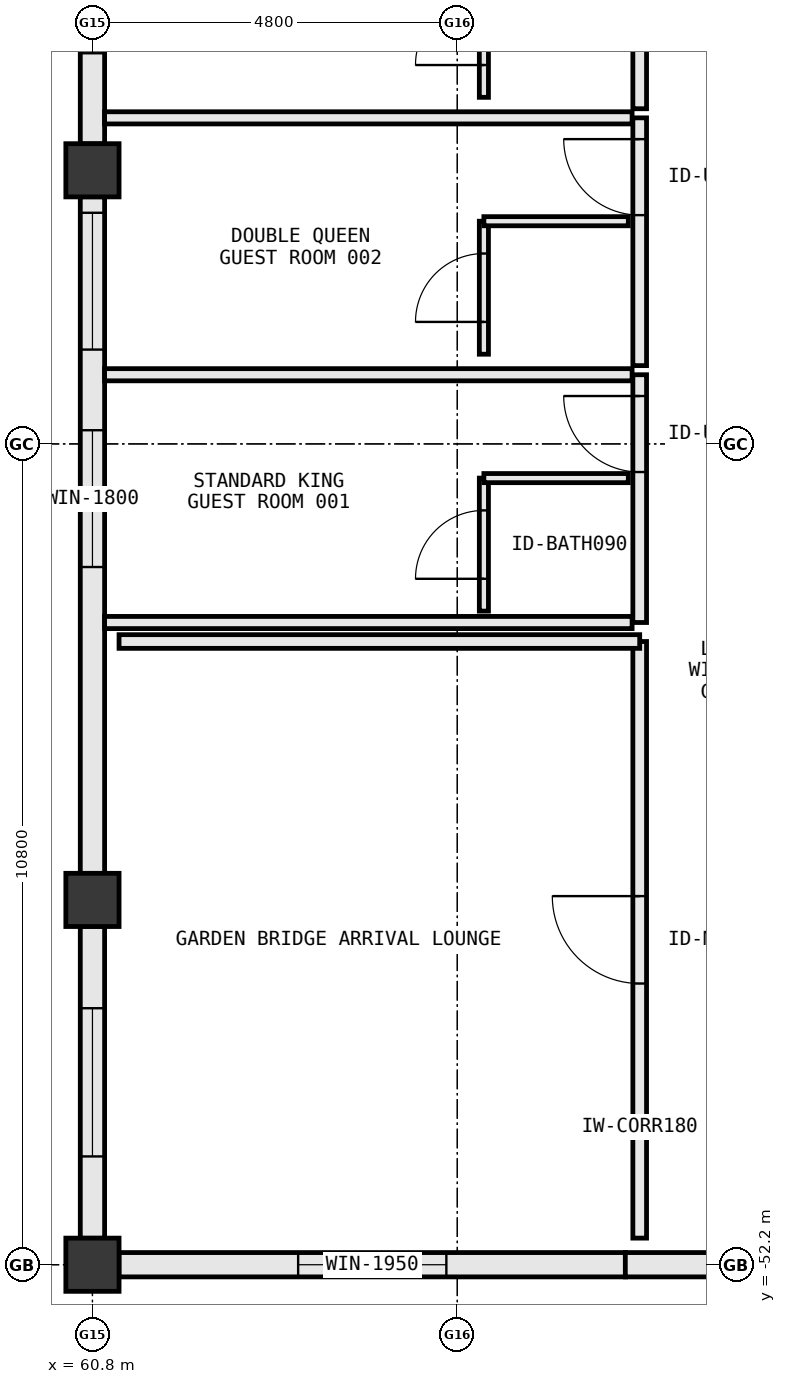
"""IFC4 building model, lengths in metres.
Left out: names, types, materials, properties, quantities, classifications, styles, units other than length and angle.
Written with IfcOpenShell. Run it as: python <this file> out.ifc"""

import sys

from ifc_helpers import new_model, si_unit, direction, frame, frame_2d, origin, origin_2d, place, context, subcontext, project, spatial, rectangle, extrude, element, fill, save


model = new_model("IFC4")
c1 = context("Model", 3, precision=1e-05, world=origin(), true_north=direction((0.0, 1.0)))
c2 = subcontext(c1, "Body", "Model", "MODEL_VIEW")
j1 = project(units=[si_unit("LENGTHUNIT", "METRE"), si_unit("PLANEANGLEUNIT", "RADIAN")], contexts=[c1])
p1 = place(None, origin())
s1 = spatial("IfcSite", under=j1, at=p1, CompositionType="ELEMENT")
p2 = place(p1, origin())
s2 = spatial("IfcBuilding", under=s1, at=p2, CompositionType="ELEMENT")
p3 = place(p2, frame((0.0, 0.0, 10.8)))
s3 = spatial("IfcBuildingStorey", under=s2, at=p3, CompositionType="ELEMENT", Elevation=10.8)
for number, where, z_axis, x_axis in (
    (1, (60.8, -52.2, 0.0), (0.0, 0.0, 1.0), (1.0, 0.0, 0.0)),
    (2, (60.8, -47.4, 0.0), (0.0, 0.0, 1.0), (1.0, 0.0, 0.0)),
    (3, (60.8, -37.8, 0.0), (0.0, 0.0, 1.0), (1.0, 0.0, 0.0)),
):
    element("IfcColumn", number, at=place(p3, frame(where, z_axis=z_axis, x_axis=x_axis)), inside=s3, PredefinedType="COLUMN", context=c2, shape_type="SweptSolid", body=[
        extrude(rectangle(XDim=0.7, YDim=0.7, at=origin_2d()), origin(), (0.0, 0.0, 1.0), 5.4),
    ])
p4 = place(p3, frame((61.148, -52.2, 0.0), z_axis=(0.0, 0.0, 1.0), x_axis=(1.0, 0.0, 0.0)))
e4 = element("IfcWall", 4, at=p4, inside=s3, PredefinedType="STANDARD", context=c2, shape_type="SweptSolid", body=[
    extrude(rectangle(XDim=6.667, YDim=0.32, at=frame_2d((3.333, 0.0))), origin(), (0.0, 0.0, 1.0), 4.183),
])
p5 = place(p4, frame((2.358, 0.0, 0.85)))
e5 = element("IfcOpeningElement", 5, at=p5, cuts=e4, PredefinedType="OPENING", context=c2, shape_type="SweptSolid", body=[
    extrude(rectangle(XDim=1.95, YDim=1.9, at=frame_2d((0.975, 0.95))), frame((0.0, 0.172, 0.0), z_axis=(0.0, -1.0, 0.0), x_axis=(1.0, 0.0, 0.0)), (0.0, 0.0, 1.0), 0.344),
])
p6 = place(p3, frame((67.811, -52.2, 0.0), z_axis=(0.0, 0.0, 1.0), x_axis=(1.0, 0.0, 0.0)))
e6 = element("IfcWall", 6, at=p6, inside=s3, PredefinedType="STANDARD", context=c2, shape_type="SweptSolid", body=[
    extrude(rectangle(XDim=6.667, YDim=0.32, at=frame_2d((3.333, 0.0))), origin(), (0.0, 0.0, 1.0), 4.183),
])
p7 = place(p3, frame((60.8, -28.548, 0.0), z_axis=(0.0, 0.0, 1.0), x_axis=(0.0, -1.0, 0.0)))
e7 = element("IfcWall", 7, at=p7, inside=s3, PredefinedType="STANDARD", context=c2, shape_type="SweptSolid", body=[
    extrude(rectangle(XDim=8.904, YDim=0.32, at=frame_2d((4.452, 0.0))), origin(), (0.0, 0.0, 1.0), 4.155),
])
p8 = place(p7, frame((5.912, 0.0, 0.85)))
e8 = element("IfcOpeningElement", 8, at=p8, cuts=e7, PredefinedType="OPENING", context=c2, shape_type="SweptSolid", body=[
    extrude(rectangle(XDim=1.8, YDim=1.85, at=frame_2d((0.9, 0.925))), frame((0.0, 0.172, 0.0), z_axis=(0.0, -1.0, 0.0), x_axis=(1.0, 0.0, 0.0)), (0.0, 0.0, 1.0), 0.344),
])
p9 = place(p7, frame((2.532, 0.0, 0.85)))
e9 = element("IfcOpeningElement", 9, at=p9, cuts=e7, PredefinedType="OPENING", context=c2, shape_type="SweptSolid", body=[
    extrude(rectangle(XDim=1.8, YDim=1.85, at=frame_2d((0.9, 0.925))), frame((0.0, 0.172, 0.0), z_axis=(0.0, -1.0, 0.0), x_axis=(1.0, 0.0, 0.0)), (0.0, 0.0, 1.0), 0.344),
])
p10 = place(p7, frame((0.166, 0.0, 0.85)))
e10 = element("IfcOpeningElement", 10, at=p10, cuts=e7, PredefinedType="OPENING", context=c2, shape_type="SweptSolid", body=[
    extrude(rectangle(XDim=1.35, YDim=1.65, at=frame_2d((0.675, 0.825))), frame((0.0, 0.172, 0.0), z_axis=(0.0, -1.0, 0.0), x_axis=(1.0, 0.0, 0.0)), (0.0, 0.0, 1.0), 0.344),
])
p11 = place(p3, frame((60.8, -38.148, 0.0), z_axis=(0.0, 0.0, 1.0), x_axis=(0.0, -1.0, 0.0)))
e11 = element("IfcWall", 11, at=p11, inside=s3, PredefinedType="STANDARD", context=c2, shape_type="SweptSolid", body=[
    extrude(rectangle(XDim=8.904, YDim=0.32, at=frame_2d((4.452, 0.0))), origin(), (0.0, 0.0, 1.0), 4.155),
])
p12 = place(p11, frame((3.072, 0.0, 0.85)))
e12 = element("IfcOpeningElement", 12, at=p12, cuts=e11, PredefinedType="OPENING", context=c2, shape_type="SweptSolid", body=[
    extrude(rectangle(XDim=1.8, YDim=1.85, at=frame_2d((0.9, 0.925))), frame((0.0, 0.172, 0.0), z_axis=(0.0, -1.0, 0.0), x_axis=(1.0, 0.0, 0.0)), (0.0, 0.0, 1.0), 0.344),
])
p13 = place(p11, frame((0.211, 0.0, 0.85)))
e13 = element("IfcOpeningElement", 13, at=p13, cuts=e11, PredefinedType="OPENING", context=c2, shape_type="SweptSolid", body=[
    extrude(rectangle(XDim=1.8, YDim=1.85, at=frame_2d((0.9, 0.925))), frame((0.0, 0.172, 0.0), z_axis=(0.0, -1.0, 0.0), x_axis=(1.0, 0.0, 0.0)), (0.0, 0.0, 1.0), 0.344),
])
p14 = place(p3, frame((60.8, -47.748, 0.0), z_axis=(0.0, 0.0, 1.0), x_axis=(0.0, -1.0, 0.0)))
e14 = element("IfcWall", 14, at=p14, inside=s3, PredefinedType="STANDARD", context=c2, shape_type="SweptSolid", body=[
    extrude(rectangle(XDim=4.104, YDim=0.32, at=frame_2d((2.052, 0.0))), origin(), (0.0, 0.0, 1.0), 4.255),
])
p15 = place(p14, frame((1.077, 0.0, 0.85)))
e15 = element("IfcOpeningElement", 15, at=p15, cuts=e14, PredefinedType="OPENING", context=c2, shape_type="SweptSolid", body=[
    extrude(rectangle(XDim=1.95, YDim=1.9, at=frame_2d((0.975, 0.95))), frame((0.0, 0.172, 0.0), z_axis=(0.0, -1.0, 0.0), x_axis=(1.0, 0.0, 0.0)), (0.0, 0.0, 1.0), 0.344),
])
p16 = place(p3, frame((68.0, -51.85, 0.0), z_axis=(0.0, 0.0, 1.0), x_axis=(0.0, 1.0, 0.0)))
e16 = element("IfcWall", 16, at=p16, inside=s3, PredefinedType="PARTITIONING", context=c2, shape_type="SweptSolid", body=[
    extrude(rectangle(XDim=7.85, YDim=0.18, at=frame_2d((3.925, 0.0))), origin(), (0.0, 0.0, 1.0), 4.8),
])
p17 = place(p16, frame((3.35, 0.0, 0.0)))
e17 = element("IfcOpeningElement", 17, at=p17, cuts=e16, PredefinedType="OPENING", context=c2, shape_type="SweptSolid", body=[
    extrude(rectangle(XDim=1.15, YDim=2.2, at=frame_2d((0.575, 1.1))), frame((0.0, 0.102, 0.0), z_axis=(0.0, -1.0, 0.0), x_axis=(1.0, 0.0, 0.0)), (0.0, 0.0, 1.0), 0.204),
])
p18 = place(p3, frame((68.0, -44.0, 0.0), z_axis=(0.0, 0.0, 1.0), x_axis=(-1.0, 0.0, 0.0)))
e18 = element("IfcWall", 18, at=p18, inside=s3, PredefinedType="PARTITIONING", context=c2, shape_type="SweptSolid", body=[
    extrude(rectangle(XDim=6.85, YDim=0.18, at=frame_2d((3.425, 0.0))), origin(), (0.0, 0.0, 1.0), 4.8),
])
p19 = place(p3, frame((68.0, -43.75, 0.0), z_axis=(0.0, 0.0, 1.0), x_axis=(0.0, 1.0, 0.0)))
e19 = element("IfcWall", 19, at=p19, inside=s3, PredefinedType="PARTITIONING", context=c2, shape_type="SweptSolid", body=[
    extrude(rectangle(XDim=3.26, YDim=0.18, at=frame_2d((1.63, 0.0))), origin(), (0.0, 0.0, 1.0), 4.8),
])
p20 = place(p19, frame((1.98, 0.0, 0.0)))
e20 = element("IfcOpeningElement", 20, at=p20, cuts=e19, PredefinedType="OPENING", context=c2, shape_type="SweptSolid", body=[
    extrude(rectangle(XDim=1.0, YDim=2.2, at=frame_2d((0.5, 1.1))), frame((0.0, 0.102, 0.0), z_axis=(0.0, -1.0, 0.0), x_axis=(1.0, 0.0, 0.0)), (0.0, 0.0, 1.0), 0.204),
])
for number, where, z_axis, x_axis in (
    (21, (60.96, -43.75, 0.0), (0.0, 0.0, 1.0), (1.0, 0.0, 0.0)),
    (22, (60.96, -40.49, 0.0), (0.0, 0.0, 1.0), (1.0, 0.0, 0.0)),
):
    element("IfcWall", number, at=place(p3, frame(where, z_axis=z_axis, x_axis=x_axis)), inside=s3, PredefinedType="PARTITIONING", context=c2, shape_type="SweptSolid", body=[
        extrude(rectangle(XDim=6.94, YDim=0.16, at=frame_2d((3.47, 0.0))), origin(), (0.0, 0.0, 1.0), 4.8),
    ])
p21 = place(p3, frame((65.95, -43.6, 0.0), z_axis=(0.0, 0.0, 1.0), x_axis=(0.0, 1.0, 0.0)))
e23 = element("IfcWall", 23, at=p21, inside=s3, PredefinedType="PARTITIONING", context=c2, shape_type="SweptSolid", body=[
    extrude(rectangle(XDim=1.75, YDim=0.12, at=frame_2d((0.875, 0.0))), origin(), (0.0, 0.0, 1.0), 4.8),
])
p22 = place(p21, frame((0.425, 0.0, 0.0)))
e24 = element("IfcOpeningElement", 24, at=p22, cuts=e23, PredefinedType="OPENING", context=c2, shape_type="SweptSolid", body=[
    extrude(rectangle(XDim=0.9, YDim=2.15, at=frame_2d((0.45, 1.075))), frame((0.0, 0.072, 0.0), z_axis=(0.0, -1.0, 0.0), x_axis=(1.0, 0.0, 0.0)), (0.0, 0.0, 1.0), 0.144),
])
p23 = place(p3, frame((65.95, -41.85, 0.0), z_axis=(0.0, 0.0, 1.0), x_axis=(1.0, 0.0, 0.0)))
e25 = element("IfcWall", 25, at=p23, inside=s3, PredefinedType="PARTITIONING", context=c2, shape_type="SweptSolid", body=[
    extrude(rectangle(XDim=1.9, YDim=0.12, at=frame_2d((0.95, 0.0))), origin(), (0.0, 0.0, 1.0), 4.8),
])
p24 = place(p3, frame((68.0, -40.37, 0.0), z_axis=(0.0, 0.0, 1.0), x_axis=(0.0, 1.0, 0.0)))
e26 = element("IfcWall", 26, at=p24, inside=s3, PredefinedType="PARTITIONING", context=c2, shape_type="SweptSolid", body=[
    extrude(rectangle(XDim=3.26, YDim=0.18, at=frame_2d((1.63, 0.0))), origin(), (0.0, 0.0, 1.0), 4.8),
])
p25 = place(p24, frame((1.98, 0.0, 0.0)))
e27 = element("IfcOpeningElement", 27, at=p25, cuts=e26, PredefinedType="OPENING", context=c2, shape_type="SweptSolid", body=[
    extrude(rectangle(XDim=1.0, YDim=2.2, at=frame_2d((0.5, 1.1))), frame((0.0, 0.102, 0.0), z_axis=(0.0, -1.0, 0.0), x_axis=(1.0, 0.0, 0.0)), (0.0, 0.0, 1.0), 0.204),
])
p26 = place(p3, frame((60.96, -37.11, 0.0), z_axis=(0.0, 0.0, 1.0), x_axis=(1.0, 0.0, 0.0)))
e28 = element("IfcWall", 28, at=p26, inside=s3, PredefinedType="PARTITIONING", context=c2, shape_type="SweptSolid", body=[
    extrude(rectangle(XDim=6.94, YDim=0.16, at=frame_2d((3.47, 0.0))), origin(), (0.0, 0.0, 1.0), 4.8),
])
p27 = place(p3, frame((65.95, -40.22, 0.0), z_axis=(0.0, 0.0, 1.0), x_axis=(0.0, 1.0, 0.0)))
e29 = element("IfcWall", 29, at=p27, inside=s3, PredefinedType="PARTITIONING", context=c2, shape_type="SweptSolid", body=[
    extrude(rectangle(XDim=1.75, YDim=0.12, at=frame_2d((0.875, 0.0))), origin(), (0.0, 0.0, 1.0), 4.8),
])
p28 = place(p27, frame((0.425, 0.0, 0.0)))
e30 = element("IfcOpeningElement", 30, at=p28, cuts=e29, PredefinedType="OPENING", context=c2, shape_type="SweptSolid", body=[
    extrude(rectangle(XDim=0.9, YDim=2.15, at=frame_2d((0.45, 1.075))), frame((0.0, 0.072, 0.0), z_axis=(0.0, -1.0, 0.0), x_axis=(1.0, 0.0, 0.0)), (0.0, 0.0, 1.0), 0.144),
])
p29 = place(p3, frame((65.95, -38.47, 0.0), z_axis=(0.0, 0.0, 1.0), x_axis=(1.0, 0.0, 0.0)))
e31 = element("IfcWall", 31, at=p29, inside=s3, PredefinedType="PARTITIONING", context=c2, shape_type="SweptSolid", body=[
    extrude(rectangle(XDim=1.9, YDim=0.12, at=frame_2d((0.95, 0.0))), origin(), (0.0, 0.0, 1.0), 4.8),
])
p30 = place(p3, frame((68.0, -36.99, 0.0), z_axis=(0.0, 0.0, 1.0), x_axis=(0.0, 1.0, 0.0)))
e32 = element("IfcWall", 32, at=p30, inside=s3, PredefinedType="PARTITIONING", context=c2, shape_type="SweptSolid", body=[
    extrude(rectangle(XDim=3.26, YDim=0.18, at=frame_2d((1.63, 0.0))), origin(), (0.0, 0.0, 1.0), 4.8),
])
p31 = place(p30, frame((1.98, 0.0, 0.0)))
e33 = element("IfcOpeningElement", 33, at=p31, cuts=e32, PredefinedType="OPENING", context=c2, shape_type="SweptSolid", body=[
    extrude(rectangle(XDim=1.0, YDim=2.2, at=frame_2d((0.5, 1.1))), frame((0.0, 0.102, 0.0), z_axis=(0.0, -1.0, 0.0), x_axis=(1.0, 0.0, 0.0)), (0.0, 0.0, 1.0), 0.204),
])
p32 = place(p3, frame((65.95, -36.84, 0.0), z_axis=(0.0, 0.0, 1.0), x_axis=(0.0, 1.0, 0.0)))
e34 = element("IfcWall", 34, at=p32, inside=s3, PredefinedType="PARTITIONING", context=c2, shape_type="SweptSolid", body=[
    extrude(rectangle(XDim=1.75, YDim=0.12, at=frame_2d((0.875, 0.0))), origin(), (0.0, 0.0, 1.0), 4.8),
])
p33 = place(p32, frame((0.425, 0.0, 0.0)))
e35 = element("IfcOpeningElement", 35, at=p33, cuts=e34, PredefinedType="OPENING", context=c2, shape_type="SweptSolid", body=[
    extrude(rectangle(XDim=0.9, YDim=2.15, at=frame_2d((0.45, 1.075))), frame((0.0, 0.072, 0.0), z_axis=(0.0, -1.0, 0.0), x_axis=(1.0, 0.0, 0.0)), (0.0, 0.0, 1.0), 0.144),
])
p34 = place(p5, origin())
e36 = element("IfcWindow", 36, at=p34, inside=s3, PartitioningType="DOUBLE_PANEL_VERTICAL", PredefinedType="WINDOW", context=c2, shape_type="SweptSolid", body=[
    extrude(rectangle(XDim=1.95, YDim=1.9, at=frame_2d((0.975, 0.95))), frame((0.0, 0.03, 0.0), z_axis=(0.0, -1.0, 0.0), x_axis=(1.0, 0.0, 0.0)), (0.0, 0.0, 1.0), 0.06),
])
fill(e5, e36)
p35 = place(p15, origin())
e37 = element("IfcWindow", 37, at=p35, inside=s3, PartitioningType="DOUBLE_PANEL_VERTICAL", PredefinedType="WINDOW", context=c2, shape_type="SweptSolid", body=[
    extrude(rectangle(XDim=1.95, YDim=1.9, at=frame_2d((0.975, 0.95))), frame((0.0, 0.03, 0.0), z_axis=(0.0, -1.0, 0.0), x_axis=(1.0, 0.0, 0.0)), (0.0, 0.0, 1.0), 0.06),
])
fill(e15, e37)
p36 = place(p12, origin())
e38 = element("IfcWindow", 38, at=p36, inside=s3, PartitioningType="SINGLE_PANEL", PredefinedType="WINDOW", context=c2, shape_type="SweptSolid", body=[
    extrude(rectangle(XDim=1.8, YDim=1.85, at=frame_2d((0.9, 0.925))), frame((0.0, 0.03, 0.0), z_axis=(0.0, -1.0, 0.0), x_axis=(1.0, 0.0, 0.0)), (0.0, 0.0, 1.0), 0.06),
])
fill(e12, e38)
p37 = place(p13, origin())
e39 = element("IfcWindow", 39, at=p37, inside=s3, PartitioningType="SINGLE_PANEL", PredefinedType="WINDOW", context=c2, shape_type="SweptSolid", body=[
    extrude(rectangle(XDim=1.8, YDim=1.85, at=frame_2d((0.9, 0.925))), frame((0.0, 0.03, 0.0), z_axis=(0.0, -1.0, 0.0), x_axis=(1.0, 0.0, 0.0)), (0.0, 0.0, 1.0), 0.06),
])
fill(e13, e39)
p38 = place(p8, origin())
e40 = element("IfcWindow", 40, at=p38, inside=s3, PartitioningType="SINGLE_PANEL", PredefinedType="WINDOW", context=c2, shape_type="SweptSolid", body=[
    extrude(rectangle(XDim=1.8, YDim=1.85, at=frame_2d((0.9, 0.925))), frame((0.0, 0.03, 0.0), z_axis=(0.0, -1.0, 0.0), x_axis=(1.0, 0.0, 0.0)), (0.0, 0.0, 1.0), 0.06),
])
fill(e8, e40)
p39 = place(p17, origin())
e41 = element("IfcDoor", 41, at=p39, inside=s3, OperationType="SINGLE_SWING_RIGHT", PredefinedType="DOOR", context=c2, shape_type="SweptSolid", body=[
    extrude(rectangle(XDim=1.15, YDim=2.2, at=frame_2d((0.575, 1.1))), frame((0.0, 0.025, 0.0), z_axis=(0.0, -1.0, 0.0), x_axis=(1.0, 0.0, 0.0)), (0.0, 0.0, 1.0), 0.05),
])
fill(e17, e41)
p40 = place(p20, origin())
e42 = element("IfcDoor", 42, at=p40, inside=s3, OperationType="SINGLE_SWING_RIGHT", PredefinedType="DOOR", context=c2, shape_type="SweptSolid", body=[
    extrude(rectangle(XDim=1.0, YDim=2.2, at=frame_2d((0.5, 1.1))), frame((0.0, 0.025, 0.0), z_axis=(0.0, -1.0, 0.0), x_axis=(1.0, 0.0, 0.0)), (0.0, 0.0, 1.0), 0.05),
])
fill(e20, e42)
p41 = place(p22, origin())
e43 = element("IfcDoor", 43, at=p41, inside=s3, OperationType="SINGLE_SWING_LEFT", PredefinedType="DOOR", context=c2, shape_type="SweptSolid", body=[
    extrude(rectangle(XDim=0.9, YDim=2.15, at=frame_2d((0.45, 1.075))), frame((0.0, 0.025, 0.0), z_axis=(0.0, -1.0, 0.0), x_axis=(1.0, 0.0, 0.0)), (0.0, 0.0, 1.0), 0.05),
])
fill(e24, e43)
p42 = place(p25, origin())
e44 = element("IfcDoor", 44, at=p42, inside=s3, OperationType="SINGLE_SWING_RIGHT", PredefinedType="DOOR", context=c2, shape_type="SweptSolid", body=[
    extrude(rectangle(XDim=1.0, YDim=2.2, at=frame_2d((0.5, 1.1))), frame((0.0, 0.025, 0.0), z_axis=(0.0, -1.0, 0.0), x_axis=(1.0, 0.0, 0.0)), (0.0, 0.0, 1.0), 0.05),
])
fill(e27, e44)
p43 = place(p28, origin())
e45 = element("IfcDoor", 45, at=p43, inside=s3, OperationType="SINGLE_SWING_LEFT", PredefinedType="DOOR", context=c2, shape_type="SweptSolid", body=[
    extrude(rectangle(XDim=0.9, YDim=2.15, at=frame_2d((0.45, 1.075))), frame((0.0, 0.025, 0.0), z_axis=(0.0, -1.0, 0.0), x_axis=(1.0, 0.0, 0.0)), (0.0, 0.0, 1.0), 0.05),
])
fill(e30, e45)
p44 = place(p33, origin())
e46 = element("IfcDoor", 46, at=p44, inside=s3, OperationType="SINGLE_SWING_LEFT", PredefinedType="DOOR", context=c2, shape_type="SweptSolid", body=[
    extrude(rectangle(XDim=0.9, YDim=2.15, at=frame_2d((0.45, 1.075))), frame((0.0, 0.025, 0.0), z_axis=(0.0, -1.0, 0.0), x_axis=(1.0, 0.0, 0.0)), (0.0, 0.0, 1.0), 0.05),
])
fill(e35, e46)
save(model, sys.argv[1])
